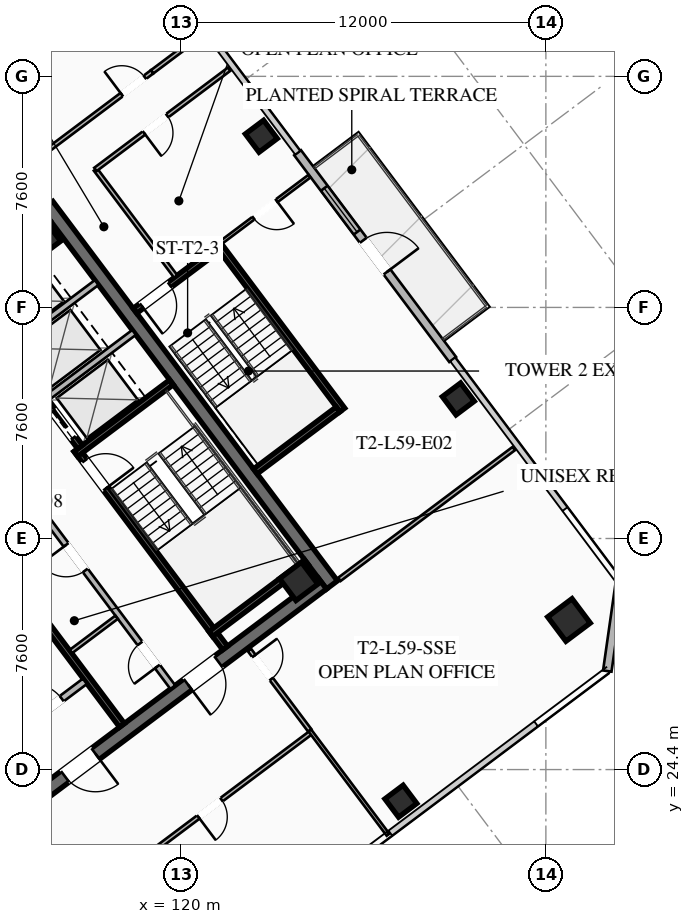
"""IFC4 building model, lengths in metres.
Left out: names, types, materials, properties, quantities, classifications, styles, units other than length and angle.
Written with IfcOpenShell. Run it as: python <this file> out.ifc"""

import sys

from ifc_helpers import new_model, si_unit, direction, frame, frame_2d, origin, origin_2d, place, context, subcontext, project, spatial, rectangle, hollow_rectangle, extrude, element, fill, save


model = new_model("IFC4")
c1 = context("Model", 3, precision=1e-05, world=origin(), true_north=direction((0.0, 1.0)))
c2 = subcontext(c1, "Body", "Model", "MODEL_VIEW")
j1 = project(units=[si_unit("LENGTHUNIT", "METRE"), si_unit("PLANEANGLEUNIT", "RADIAN")], contexts=[c1])
p1 = place(None, origin())
s1 = spatial("IfcSite", under=j1, at=p1, CompositionType="ELEMENT")
p2 = place(p1, origin())
s2 = spatial("IfcBuilding", under=s1, at=p2, CompositionType="ELEMENT")
p3 = place(p2, frame((0.0, 0.0, 218.4)))
s3 = spatial("IfcBuildingStorey", under=s2, at=p3, CompositionType="ELEMENT", Elevation=218.4)
p4 = place(p3, frame((115.604, 42.953, 0.0), z_axis=(0.0, 0.0, 1.0), x_axis=(0.600005007985, -0.799996243986, 0.0)))
e1 = element("IfcWall", 1, at=p4, inside=s3, PredefinedType="SHEAR", context=c2, shape_type="SweptSolid", body=[
    extrude(rectangle(XDim=15.6, YDim=0.45, at=frame_2d((7.8, 0.0))), origin(), (0.0, 0.0, 1.0), 3.55),
])
p5 = place(p3, frame((124.649, 30.518, 0.0), z_axis=(0.0, 0.0, 1.0), x_axis=(-0.8, -0.6, 0.0)))
e2 = element("IfcWall", 2, at=p5, inside=s3, PredefinedType="SHEAR", context=c2, shape_type="SweptSolid", body=[
    extrude(rectangle(XDim=15.26, YDim=0.45, at=frame_2d((7.63, 0.0))), origin(), (0.0, 0.0, 1.0), 3.55),
])
p6 = place(p5, frame((9.33, 0.0, 0.0)))
e3 = element("IfcOpeningElement", 3, at=p6, cuts=e2, PredefinedType="OPENING", context=c2, shape_type="SweptSolid", body=[
    extrude(rectangle(XDim=1.25, YDim=2.25, at=frame_2d((0.625, 1.125))), frame((0.0, 0.235, 0.0), z_axis=(0.0, -1.0, 0.0), x_axis=(1.0, 0.0, 0.0)), (0.0, 0.0, 1.0), 0.47),
])
p7 = place(p5, frame((4.28, 0.0, 0.0)))
e4 = element("IfcOpeningElement", 4, at=p7, cuts=e2, PredefinedType="OPENING", context=c2, shape_type="SweptSolid", body=[
    extrude(rectangle(XDim=1.25, YDim=2.25, at=frame_2d((0.625, 1.125))), frame((0.0, 0.235, 0.0), z_axis=(0.0, -1.0, 0.0), x_axis=(1.0, 0.0, 0.0)), (0.0, 0.0, 1.0), 0.47),
])
for number, where, z_axis, x_axis in (
    (5, (123.87, 30.59, 0.0), (0.0, 0.0, 1.0), (0.8, 0.6, 0.0)),
    (6, (115.41, 41.87, 0.0), (0.0, 0.0, 1.0), (0.8, 0.6, 0.0)),
):
    element("IfcColumn", number, at=place(p3, frame(where, z_axis=z_axis, x_axis=x_axis)), inside=s3, PredefinedType="COLUMN", context=c2, shape_type="SweptSolid", body=[
        extrude(hollow_rectangle(XDim=0.9, YDim=0.9, WallThickness=0.04, at=origin_2d()), origin(), (0.0, 0.0, 1.0), 3.37),
    ])
p8 = place(p3, frame((132.76, 29.32, 0.0), z_axis=(0.0, 0.0, 1.0), x_axis=(0.799999996291, 0.600000004945, 0.0)))
e7 = element("IfcColumn", 7, at=p8, inside=s3, PredefinedType="COLUMN", context=c2, shape_type="SweptSolid", body=[
    extrude(hollow_rectangle(XDim=1.0, YDim=1.0, WallThickness=0.04, at=origin_2d()), origin(), (0.0, 0.0, 1.0), 3.37),
])
for number, where, z_axis, x_axis in (
    (8, (127.23, 23.36, 0.0), (0.0, 0.0, 1.0), (0.8, 0.6, 0.0)),
    (9, (129.12, 36.59, 0.0), (0.0, 0.0, 1.0), (0.8, 0.6, 0.0)),
    (10, (122.64, 45.23, 0.0), (0.0, 0.0, 1.0), (0.8, 0.6, 0.0)),
):
    element("IfcColumn", number, at=place(p3, frame(where, z_axis=z_axis, x_axis=x_axis)), inside=s3, PredefinedType="COLUMN", context=c2, shape_type="SweptSolid", body=[
        extrude(hollow_rectangle(XDim=0.75, YDim=0.75, WallThickness=0.032, at=origin_2d()), origin(), (0.0, 0.0, 1.0), 3.37),
    ])
p9 = place(p3, frame((123.834, 44.688, 0.0), z_axis=(0.0, 0.0, 1.0), x_axis=(0.600004595526, -0.799996553335, 0.0)))
e11 = element("IfcWall", 11, at=p9, inside=s3, PredefinedType="SOLIDWALL", context=c2, shape_type="SweptSolid", body=[
    extrude(rectangle(XDim=8.5, YDim=0.28, at=frame_2d((4.25, 0.0))), origin(), (0.0, 0.0, 1.0), 3.37),
])
p10 = place(p9, frame((3.6, 0.0, 0.0)))
e12 = element("IfcOpeningElement", 12, at=p10, cuts=e11, PredefinedType="OPENING", context=c2, shape_type="SweptSolid", body=[
    extrude(rectangle(XDim=1.3, YDim=2.15, at=frame_2d((0.65, 1.075))), frame((0.0, 0.15, 0.0), z_axis=(0.0, -1.0, 0.0), x_axis=(1.0, 0.0, 0.0)), (0.0, 0.0, 1.0), 0.3),
])
p11 = place(p9, frame((1.46, 0.0, 0.85)))
e13 = element("IfcOpeningElement", 13, at=p11, cuts=e11, PredefinedType="OPENING", context=c2, shape_type="SweptSolid", body=[
    extrude(rectangle(XDim=1.8, YDim=1.92, at=frame_2d((0.9, 0.96))), frame((0.0, 0.15, 0.0), z_axis=(0.0, -1.0, 0.0), x_axis=(1.0, 0.0, 0.0)), (0.0, 0.0, 1.0), 0.3),
])
p12 = place(p3, frame((134.44, 30.58, 0.0), z_axis=(0.0, 0.0, 1.0), x_axis=(-0.14138683146, -0.989954425158, 0.0)))
e14 = element("IfcWall", 14, at=p12, inside=s3, PredefinedType="SOLIDWALL", context=c2, shape_type="SweptSolid", body=[
    extrude(rectangle(XDim=2.97, YDim=0.28, at=frame_2d((1.485, 0.0))), origin(), (0.0, 0.0, 1.0), 3.37),
])
p13 = place(p3, frame((116.56, 34.92, 0.0), z_axis=(0.0, 0.0, 1.0), x_axis=(0.59999041401, -0.800007189403, 0.0)))
e15 = element("IfcWall", 15, at=p13, inside=s3, PredefinedType="SHEAR", context=c2, shape_type="SweptSolid", body=[
    extrude(rectangle(XDim=8.15, YDim=0.2, at=frame_2d((4.075, 0.0))), origin(), (0.0, 0.0, 1.0), 3.37),
])
p14 = place(p13, frame((0.45, 0.0, 0.0)))
e16 = element("IfcOpeningElement", 16, at=p14, cuts=e15, PredefinedType="OPENING", context=c2, shape_type="SweptSolid", body=[
    extrude(rectangle(XDim=1.15, YDim=2.2, at=frame_2d((0.575, 1.1))), frame((0.0, 0.11, 0.0), z_axis=(0.0, -1.0, 0.0), x_axis=(1.0, 0.0, 0.0)), (0.0, 0.0, 1.0), 0.22),
])
for number, where, z_axis, x_axis in (
    (17, (116.54, 34.78, 0.0), (0.0, 0.0, 1.0), (0.8, 0.6, 0.0)),
    (18, (120.98, 28.86, 0.0), (0.0, 0.0, 1.0), (0.8, 0.6, 0.0)),
):
    element("IfcWall", number, at=place(p3, frame(where, z_axis=z_axis, x_axis=x_axis)), inside=s3, PredefinedType="SHEAR", context=c2, shape_type="SweptSolid", body=[
        extrude(rectangle(XDim=3.93, YDim=0.2, at=frame_2d((1.965, 0.0))), origin(), (0.0, 0.0, 1.0), 3.37),
    ])
p15 = place(p3, frame((118.058, 25.856, 0.0), z_axis=(0.0, 0.0, 1.0), x_axis=(-0.600002657301, 0.799998007018, 0.0)))
e19 = element("IfcWall", 19, at=p15, inside=s3, PredefinedType="SHEAR", context=c2, shape_type="SweptSolid", body=[
    extrude(rectangle(XDim=14.7, YDim=0.2, at=frame_2d((7.35, 0.0))), origin(), (0.0, 0.0, 1.0), 3.37),
])
p16 = place(p3, frame((114.316, 25.412, 0.0), z_axis=(0.0, 0.0, 1.0), x_axis=(0.800018601094, 0.59997519774, 0.0)))
e20 = element("IfcWall", 20, at=p16, inside=s3, PredefinedType="SOLIDWALL", context=c2, shape_type="SweptSolid", body=[
    extrude(rectangle(XDim=3.15, YDim=0.22, at=frame_2d((1.575, 0.0))), origin(), (0.0, 0.0, 1.0), 2.723),
])
p17 = place(p16, frame((0.95, 0.0, 0.0)))
e21 = element("IfcOpeningElement", 21, at=p17, cuts=e20, PredefinedType="OPENING", context=c2, shape_type="SweptSolid", body=[
    extrude(rectangle(XDim=1.25, YDim=2.25, at=frame_2d((0.625, 1.125))), frame((0.0, 0.12, 0.0), z_axis=(0.0, -1.0, 0.0), x_axis=(1.0, 0.0, 0.0)), (0.0, 0.0, 1.0), 0.24),
])
p18 = place(p3, frame((112.75, 40.25, 0.0), z_axis=(0.0, 0.0, 1.0), x_axis=(0.599994036198, -0.800004472816, 0.0)))
e22 = element("IfcWall", 22, at=p18, inside=s3, PredefinedType="SHEAR", context=c2, shape_type="SweptSolid", body=[
    extrude(rectangle(XDim=6.55, YDim=0.2, at=frame_2d((3.275, 0.0))), origin(), (0.0, 0.0, 1.0), 3.37),
])
p19 = place(p18, frame((5.075, 0.0, 0.0)))
e23 = element("IfcOpeningElement", 23, at=p19, cuts=e22, PredefinedType="OPENING", context=c2, shape_type="SweptSolid", body=[
    extrude(rectangle(XDim=1.1, YDim=2.2, at=frame_2d((0.55, 1.1))), frame((0.0, 0.11, 0.0), z_axis=(0.0, -1.0, 0.0), x_axis=(1.0, 0.0, 0.0)), (0.0, 0.0, 1.0), 0.22),
])
p20 = place(p18, frame((3.025, 0.0, 0.0)))
e24 = element("IfcOpeningElement", 24, at=p20, cuts=e22, PredefinedType="OPENING", context=c2, shape_type="SweptSolid", body=[
    extrude(rectangle(XDim=1.1, YDim=2.2, at=frame_2d((0.55, 1.1))), frame((0.0, 0.11, 0.0), z_axis=(0.0, -1.0, 0.0), x_axis=(1.0, 0.0, 0.0)), (0.0, 0.0, 1.0), 0.22),
])
p21 = place(p18, frame((1.025, 0.0, 0.0)))
e25 = element("IfcOpeningElement", 25, at=p21, cuts=e22, PredefinedType="OPENING", context=c2, shape_type="SweptSolid", body=[
    extrude(rectangle(XDim=1.1, YDim=2.2, at=frame_2d((0.55, 1.1))), frame((0.0, 0.11, 0.0), z_axis=(0.0, -1.0, 0.0), x_axis=(1.0, 0.0, 0.0)), (0.0, 0.0, 1.0), 0.22),
])
for number, where, z_axis, x_axis in (
    (26, (115.59, 36.63, 0.0), (0.0, 0.0, 1.0), (0.8, 0.6, 0.0)),
    (27, (114.36, 38.27, 0.0), (0.0, 0.0, 1.0), (0.8, 0.6, 0.0)),
):
    element("IfcWall", number, at=place(p3, frame(where, z_axis=z_axis, x_axis=x_axis)), inside=s3, PredefinedType="SOLIDWALL", context=c2, shape_type="SweptSolid", body=[
        extrude(rectangle(XDim=3.58, YDim=0.2, at=frame_2d((1.79, 0.0))), origin(), (0.0, 0.0, 1.0), 3.37),
    ])
p22 = place(p3, frame((119.73, 27.11, 0.0), z_axis=(0.0, 0.0, 1.0), x_axis=(-0.600005580459, 0.799995814625, 0.0)))
e28 = element("IfcWall", 28, at=p22, inside=s3, PredefinedType="SOLIDWALL", context=c2, shape_type="SweptSolid", body=[
    extrude(rectangle(XDim=7.0, YDim=0.2, at=frame_2d((3.5, 0.0))), origin(), (0.0, 0.0, 1.0), 2.723),
])
p23 = place(p22, frame((0.85, 0.0, 0.0)))
e29 = element("IfcOpeningElement", 29, at=p23, cuts=e28, PredefinedType="OPENING", context=c2, shape_type="SweptSolid", body=[
    extrude(rectangle(XDim=0.95, YDim=2.05, at=frame_2d((0.475, 1.025))), frame((0.0, 0.11, 0.0), z_axis=(0.0, -1.0, 0.0), x_axis=(1.0, 0.0, 0.0)), (0.0, 0.0, 1.0), 0.22),
])
p24 = place(p22, frame((4.8, 0.0, 0.0)))
e30 = element("IfcOpeningElement", 30, at=p24, cuts=e28, PredefinedType="OPENING", context=c2, shape_type="SweptSolid", body=[
    extrude(rectangle(XDim=1.05, YDim=2.2, at=frame_2d((0.525, 1.1))), frame((0.0, 0.11, 0.0), z_axis=(0.0, -1.0, 0.0), x_axis=(1.0, 0.0, 0.0)), (0.0, 0.0, 1.0), 0.22),
])
p25 = place(p3, frame((116.376, 28.282, 0.0), z_axis=(0.0, 0.0, 1.0), x_axis=(0.8, 0.6, 0.0)))
e31 = element("IfcWall", 31, at=p25, inside=s3, PredefinedType="PARTITIONING", context=c2, shape_type="SweptSolid", body=[
    extrude(rectangle(XDim=1.88, YDim=0.135, at=frame_2d((0.94, 0.0))), origin(), (0.0, 0.0, 1.0), 2.723),
])
p26 = place(p3, frame((125.304, 36.228, 0.0), z_axis=(0.0, 0.0, 1.0), x_axis=(-0.59998851072, 0.800008616831, 0.0)))
e32 = element("IfcWall", 32, at=p26, inside=s3, PredefinedType="SHEAR", context=c2, shape_type="SweptSolid", body=[
    extrude(rectangle(XDim=6.8, YDim=0.2, at=frame_2d((3.4, 0.0))), origin(), (0.0, 0.0, 1.0), 3.37),
])
p27 = place(p3, frame((121.204, 41.528, 0.0), z_axis=(0.0, 0.0, 1.0), x_axis=(-0.800017232136, -0.599977023131, 0.0)))
e33 = element("IfcWall", 33, at=p27, inside=s3, PredefinedType="SHEAR", context=c2, shape_type="SweptSolid", body=[
    extrude(rectangle(XDim=3.4, YDim=0.2, at=frame_2d((1.7, 0.0))), origin(), (0.0, 0.0, 1.0), 3.37),
])
p28 = place(p27, frame((1.975, 0.0, 0.0)))
e34 = element("IfcOpeningElement", 34, at=p28, cuts=e33, PredefinedType="OPENING", context=c2, shape_type="SweptSolid", body=[
    extrude(rectangle(XDim=1.15, YDim=2.2, at=frame_2d((0.575, 1.1))), frame((0.0, 0.11, 0.0), z_axis=(0.0, -1.0, 0.0), x_axis=(1.0, 0.0, 0.0)), (0.0, 0.0, 1.0), 0.22),
])
p29 = place(p3, frame((122.444, 34.208, 0.0), z_axis=(0.0, 0.0, 1.0), x_axis=(0.79999138319, 0.600011488909, 0.0)))
e35 = element("IfcWall", 35, at=p29, inside=s3, PredefinedType="SHEAR", context=c2, shape_type="SweptSolid", body=[
    extrude(rectangle(XDim=3.4, YDim=0.2, at=frame_2d((1.7, 0.0))), origin(), (0.0, 0.0, 1.0), 3.37),
])
p30 = place(p3, frame((119.824, 40.618, 0.0), z_axis=(0.0, 0.0, 1.0), x_axis=(-0.599982243973, 0.800013316712, 0.0)))
e36 = element("IfcWall", 36, at=p30, inside=s3, PredefinedType="PARTITIONING", context=c2, shape_type="SweptSolid", body=[
    extrude(rectangle(XDim=4.4, YDim=0.135, at=frame_2d((2.2, 0.0))), origin(), (0.0, 0.0, 1.0), 2.723),
])
p31 = place(p3, frame((100.826, 33.682, 0.0), z_axis=(0.0, 0.0, 1.0), x_axis=(0.79999742786, 0.600003429504, 0.0)))
e37 = element("IfcWall", 37, at=p31, inside=s3, PredefinedType="PARTITIONING", context=c2, shape_type="SweptSolid", body=[
    extrude(rectangle(XDim=22.78, YDim=0.135, at=frame_2d((11.39, 0.0))), origin(), (0.0, 0.0, 1.0), 2.723),
])
p32 = place(p31, frame((0.3, 0.0, 0.0)))
e38 = element("IfcOpeningElement", 38, at=p32, cuts=e37, PredefinedType="OPENING", context=c2, shape_type="SweptSolid", body=[
    extrude(rectangle(XDim=0.95, YDim=2.05, at=frame_2d((0.475, 1.025))), frame((0.0, 0.077, 0.0), z_axis=(0.0, -1.0, 0.0), x_axis=(1.0, 0.0, 0.0)), (0.0, 0.0, 1.0), 0.155),
])
p33 = place(p31, frame((9.143, 0.0, 0.0)))
e39 = element("IfcOpeningElement", 39, at=p33, cuts=e37, PredefinedType="OPENING", context=c2, shape_type="SweptSolid", body=[
    extrude(rectangle(XDim=0.95, YDim=2.05, at=frame_2d((0.475, 1.025))), frame((0.0, 0.077, 0.0), z_axis=(0.0, -1.0, 0.0), x_axis=(1.0, 0.0, 0.0)), (0.0, 0.0, 1.0), 0.155),
])
p34 = place(p31, frame((21.53, 0.0, 0.0)))
e40 = element("IfcOpeningElement", 40, at=p34, cuts=e37, PredefinedType="OPENING", context=c2, shape_type="SweptSolid", body=[
    extrude(rectangle(XDim=0.95, YDim=2.05, at=frame_2d((0.475, 1.025))), frame((0.0, 0.077, 0.0), z_axis=(0.0, -1.0, 0.0), x_axis=(1.0, 0.0, 0.0)), (0.0, 0.0, 1.0), 0.155),
])
p35 = place(p3, frame((119.05, 47.35, 0.0), z_axis=(0.0, 0.0, 1.0), x_axis=(0.800013138111, 0.599982482119, 0.0)))
e41 = element("IfcWall", 41, at=p35, inside=s3, PredefinedType="PARTITIONING", context=c2, shape_type="SweptSolid", body=[
    extrude(rectangle(XDim=2.23, YDim=0.135, at=frame_2d((1.115, 0.0))), origin(), (0.0, 0.0, 1.0), 2.723),
])
p36 = place(p3, frame((124.282, 25.624, 0.0), z_axis=(0.0, 0.0, 1.0), x_axis=(-0.800004206286, -0.599994391578, 0.0)))
e42 = element("IfcWall", 42, at=p36, inside=s3, PredefinedType="PARTITIONING", context=c2, shape_type="SweptSolid", body=[
    extrude(rectangle(XDim=13.93, YDim=0.135, at=frame_2d((6.965, 0.0))), origin(), (0.0, 0.0, 1.0), 2.723),
])
p37 = place(p36, frame((3.69, 0.0, 0.0)))
e43 = element("IfcOpeningElement", 43, at=p37, cuts=e42, PredefinedType="OPENING", context=c2, shape_type="SweptSolid", body=[
    extrude(rectangle(XDim=0.95, YDim=2.05, at=frame_2d((0.475, 1.025))), frame((0.0, 0.077, 0.0), z_axis=(0.0, -1.0, 0.0), x_axis=(1.0, 0.0, 0.0)), (0.0, 0.0, 1.0), 0.155),
])
p38 = place(p3, frame((122.248, 28.336, 0.0), z_axis=(0.0, 0.0, 1.0), x_axis=(0.599976396045, -0.800017702422, 0.0)))
e44 = element("IfcWall", 44, at=p38, inside=s3, PredefinedType="PARTITIONING", context=c2, shape_type="SweptSolid", body=[
    extrude(rectangle(XDim=3.31, YDim=0.135, at=frame_2d((1.655, 0.0))), origin(), (0.0, 0.0, 1.0), 2.723),
])
p39 = place(p38, frame((0.25, 0.0, 0.0)))
e45 = element("IfcOpeningElement", 45, at=p39, cuts=e44, PredefinedType="OPENING", context=c2, shape_type="SweptSolid", body=[
    extrude(rectangle(XDim=0.95, YDim=2.05, at=frame_2d((0.475, 1.025))), frame((0.0, 0.077, 0.0), z_axis=(0.0, -1.0, 0.0), x_axis=(1.0, 0.0, 0.0)), (0.0, 0.0, 1.0), 0.155),
])
p40 = place(p3, frame((126.808, 22.256, 0.0), z_axis=(0.0, 0.0, 1.0), x_axis=(-0.600045526003, 0.799965853474, 0.0)))
e46 = element("IfcWall", 46, at=p40, inside=s3, PredefinedType="PARTITIONING", context=c2, shape_type="SweptSolid", body=[
    extrude(rectangle(XDim=4.29, YDim=0.11, at=frame_2d((2.145, 0.0))), origin(), (0.0, 0.0, 1.0), 2.723),
])
p41 = place(p3, frame((121.584, 47.438, 0.0), z_axis=(0.0, 0.0, 1.0), x_axis=(-0.79998934637, -0.600014204577, 0.0)))
e47 = element("IfcWall", 47, at=p41, inside=s3, PredefinedType="PARTITIONING", context=c2, shape_type="SweptSolid", body=[
    extrude(rectangle(XDim=5.5, YDim=0.135, at=frame_2d((2.75, 0.0))), origin(), (0.0, 0.0, 1.0), 2.723),
])
p42 = place(p41, frame((2.55, 0.0, 0.0)))
e48 = element("IfcOpeningElement", 48, at=p42, cuts=e47, PredefinedType="OPENING", context=c2, shape_type="SweptSolid", body=[
    extrude(rectangle(XDim=0.95, YDim=2.05, at=frame_2d((0.475, 1.025))), frame((0.0, 0.077, 0.0), z_axis=(0.0, -1.0, 0.0), x_axis=(1.0, 0.0, 0.0)), (0.0, 0.0, 1.0), 0.155),
])
p43 = place(p3, frame((125.208, 30.656, 0.0), z_axis=(0.0, 0.0, 1.0), x_axis=(0.800004085978, 0.599994551991, 0.0)))
e49 = element("IfcWall", 49, at=p43, inside=s3, PredefinedType="PARTITIONING", context=c2, shape_type="SweptSolid", body=[
    extrude(rectangle(XDim=7.17, YDim=0.135, at=frame_2d((3.585, 0.0))), origin(), (0.0, 0.0, 1.0), 2.723),
])
p44 = place(p3, frame((124.224, 43.918, 0.0), z_axis=(0.0, 0.0, 1.0), x_axis=(-0.800024078335, -0.599967894211, 0.0)))
e50 = element("IfcWall", 50, at=p44, inside=s3, PredefinedType="PARTITIONING", context=c2, shape_type="SweptSolid", body=[
    extrude(rectangle(XDim=3.65, YDim=0.11, at=frame_2d((1.825, 0.0))), origin(), (0.0, 0.0, 1.0), 2.723),
])
p45 = place(p44, frame((1.35, 0.0, 0.0)))
e51 = element("IfcOpeningElement", 51, at=p45, cuts=e50, PredefinedType="OPENING", context=c2, shape_type="SweptSolid", body=[
    extrude(rectangle(XDim=0.95, YDim=2.05, at=frame_2d((0.475, 1.025))), frame((0.0, 0.065, 0.0), z_axis=(0.0, -1.0, 0.0), x_axis=(1.0, 0.0, 0.0)), (0.0, 0.0, 1.0), 0.13),
])
p46 = place(p10, origin())
e52 = element("IfcDoor", 52, at=p46, inside=s3, OperationType="SINGLE_SWING_RIGHT", PredefinedType="DOOR", context=c2, shape_type="SweptSolid", body=[
    extrude(rectangle(XDim=1.3, YDim=2.15, at=frame_2d((0.65, 1.075))), frame((0.0, 0.025, 0.0), z_axis=(0.0, -1.0, 0.0), x_axis=(1.0, 0.0, 0.0)), (0.0, 0.0, 1.0), 0.05),
])
fill(e12, e52)
p47 = place(p11, origin())
e53 = element("IfcWindow", 53, at=p47, inside=s3, PartitioningType="SINGLE_PANEL", PredefinedType="WINDOW", context=c2, shape_type="SweptSolid", body=[
    extrude(rectangle(XDim=1.8, YDim=1.92, at=frame_2d((0.9, 0.96))), frame((0.0, 0.03, 0.0), z_axis=(0.0, -1.0, 0.0), x_axis=(1.0, 0.0, 0.0)), (0.0, 0.0, 1.0), 0.06),
])
fill(e13, e53)
p48 = place(p6, origin())
e54 = element("IfcDoor", 54, at=p48, inside=s3, OperationType="SINGLE_SWING_LEFT", PredefinedType="DOOR", context=c2, shape_type="SweptSolid", body=[
    extrude(rectangle(XDim=1.25, YDim=2.25, at=frame_2d((0.625, 1.125))), frame((0.0, 0.025, 0.0), z_axis=(0.0, -1.0, 0.0), x_axis=(1.0, 0.0, 0.0)), (0.0, 0.0, 1.0), 0.05),
])
fill(e3, e54)
p49 = place(p7, origin())
e55 = element("IfcDoor", 55, at=p49, inside=s3, OperationType="SINGLE_SWING_RIGHT", PredefinedType="DOOR", context=c2, shape_type="SweptSolid", body=[
    extrude(rectangle(XDim=1.25, YDim=2.25, at=frame_2d((0.625, 1.125))), frame((0.0, 0.025, 0.0), z_axis=(0.0, -1.0, 0.0), x_axis=(1.0, 0.0, 0.0)), (0.0, 0.0, 1.0), 0.05),
])
fill(e4, e55)
p50 = place(p14, origin())
e56 = element("IfcDoor", 56, at=p50, inside=s3, OperationType="SINGLE_SWING_RIGHT", PredefinedType="DOOR", context=c2, shape_type="SweptSolid", body=[
    extrude(rectangle(XDim=1.15, YDim=2.2, at=frame_2d((0.575, 1.1))), frame((0.0, 0.025, 0.0), z_axis=(0.0, -1.0, 0.0), x_axis=(1.0, 0.0, 0.0)), (0.0, 0.0, 1.0), 0.05),
])
fill(e16, e56)
p51 = place(p17, origin())
e57 = element("IfcDoor", 57, at=p51, inside=s3, OperationType="SINGLE_SWING_LEFT", PredefinedType="DOOR", context=c2, shape_type="SweptSolid", body=[
    extrude(rectangle(XDim=1.25, YDim=2.25, at=frame_2d((0.625, 1.125))), frame((0.0, 0.025, 0.0), z_axis=(0.0, -1.0, 0.0), x_axis=(1.0, 0.0, 0.0)), (0.0, 0.0, 1.0), 0.05),
])
fill(e21, e57)
p52 = place(p23, origin())
e58 = element("IfcDoor", 58, at=p52, inside=s3, OperationType="SINGLE_SWING_LEFT", PredefinedType="DOOR", context=c2, shape_type="SweptSolid", body=[
    extrude(rectangle(XDim=0.95, YDim=2.05, at=frame_2d((0.475, 1.025))), frame((0.0, 0.025, 0.0), z_axis=(0.0, -1.0, 0.0), x_axis=(1.0, 0.0, 0.0)), (0.0, 0.0, 1.0), 0.05),
])
fill(e29, e58)
p53 = place(p24, origin())
e59 = element("IfcDoor", 59, at=p53, inside=s3, OperationType="SINGLE_SWING_RIGHT", PredefinedType="DOOR", context=c2, shape_type="SweptSolid", body=[
    extrude(rectangle(XDim=1.05, YDim=2.2, at=frame_2d((0.525, 1.1))), frame((0.0, 0.025, 0.0), z_axis=(0.0, -1.0, 0.0), x_axis=(1.0, 0.0, 0.0)), (0.0, 0.0, 1.0), 0.05),
])
fill(e30, e59)
p54 = place(p28, origin())
e60 = element("IfcDoor", 60, at=p54, inside=s3, OperationType="SINGLE_SWING_RIGHT", PredefinedType="DOOR", context=c2, shape_type="SweptSolid", body=[
    extrude(rectangle(XDim=1.15, YDim=2.2, at=frame_2d((0.575, 1.1))), frame((0.0, 0.025, 0.0), z_axis=(0.0, -1.0, 0.0), x_axis=(1.0, 0.0, 0.0)), (0.0, 0.0, 1.0), 0.05),
])
fill(e34, e60)
p55 = place(p34, origin())
e61 = element("IfcDoor", 61, at=p55, inside=s3, OperationType="SINGLE_SWING_LEFT", PredefinedType="DOOR", context=c2, shape_type="SweptSolid", body=[
    extrude(rectangle(XDim=0.95, YDim=2.05, at=frame_2d((0.475, 1.025))), frame((0.0, 0.025, 0.0), z_axis=(0.0, -1.0, 0.0), x_axis=(1.0, 0.0, 0.0)), (0.0, 0.0, 1.0), 0.05),
])
fill(e40, e61)
p56 = place(p37, origin())
e62 = element("IfcDoor", 62, at=p56, inside=s3, OperationType="SINGLE_SWING_RIGHT", PredefinedType="DOOR", context=c2, shape_type="SweptSolid", body=[
    extrude(rectangle(XDim=0.95, YDim=2.05, at=frame_2d((0.475, 1.025))), frame((0.0, 0.025, 0.0), z_axis=(0.0, -1.0, 0.0), x_axis=(1.0, 0.0, 0.0)), (0.0, 0.0, 1.0), 0.05),
])
fill(e43, e62)
p57 = place(p39, origin())
e63 = element("IfcDoor", 63, at=p57, inside=s3, OperationType="SINGLE_SWING_LEFT", PredefinedType="DOOR", context=c2, shape_type="SweptSolid", body=[
    extrude(rectangle(XDim=0.95, YDim=2.05, at=frame_2d((0.475, 1.025))), frame((0.0, 0.025, 0.0), z_axis=(0.0, -1.0, 0.0), x_axis=(1.0, 0.0, 0.0)), (0.0, 0.0, 1.0), 0.05),
])
fill(e45, e63)
p58 = place(p42, origin())
e64 = element("IfcDoor", 64, at=p58, inside=s3, OperationType="SINGLE_SWING_RIGHT", PredefinedType="DOOR", context=c2, shape_type="SweptSolid", body=[
    extrude(rectangle(XDim=0.95, YDim=2.05, at=frame_2d((0.475, 1.025))), frame((0.0, 0.025, 0.0), z_axis=(0.0, -1.0, 0.0), x_axis=(1.0, 0.0, 0.0)), (0.0, 0.0, 1.0), 0.05),
])
fill(e48, e64)
p59 = place(p45, origin())
e65 = element("IfcDoor", 65, at=p59, inside=s3, OperationType="SINGLE_SWING_LEFT", PredefinedType="DOOR", context=c2, shape_type="SweptSolid", body=[
    extrude(rectangle(XDim=0.95, YDim=2.05, at=frame_2d((0.475, 1.025))), frame((0.0, 0.025, 0.0), z_axis=(0.0, -1.0, 0.0), x_axis=(1.0, 0.0, 0.0)), (0.0, 0.0, 1.0), 0.05),
])
fill(e51, e65)
p60 = place(p19, origin())
e66 = element("IfcDoor", 66, at=p60, inside=s3, OperationType="SLIDING_TO_LEFT", PredefinedType="DOOR", context=c2, shape_type="SweptSolid", body=[
    extrude(rectangle(XDim=1.1, YDim=2.2, at=frame_2d((0.55, 1.1))), frame((0.0, 0.025, 0.0), z_axis=(0.0, -1.0, 0.0), x_axis=(1.0, 0.0, 0.0)), (0.0, 0.0, 1.0), 0.05),
])
fill(e23, e66)
save(model, sys.argv[1])
